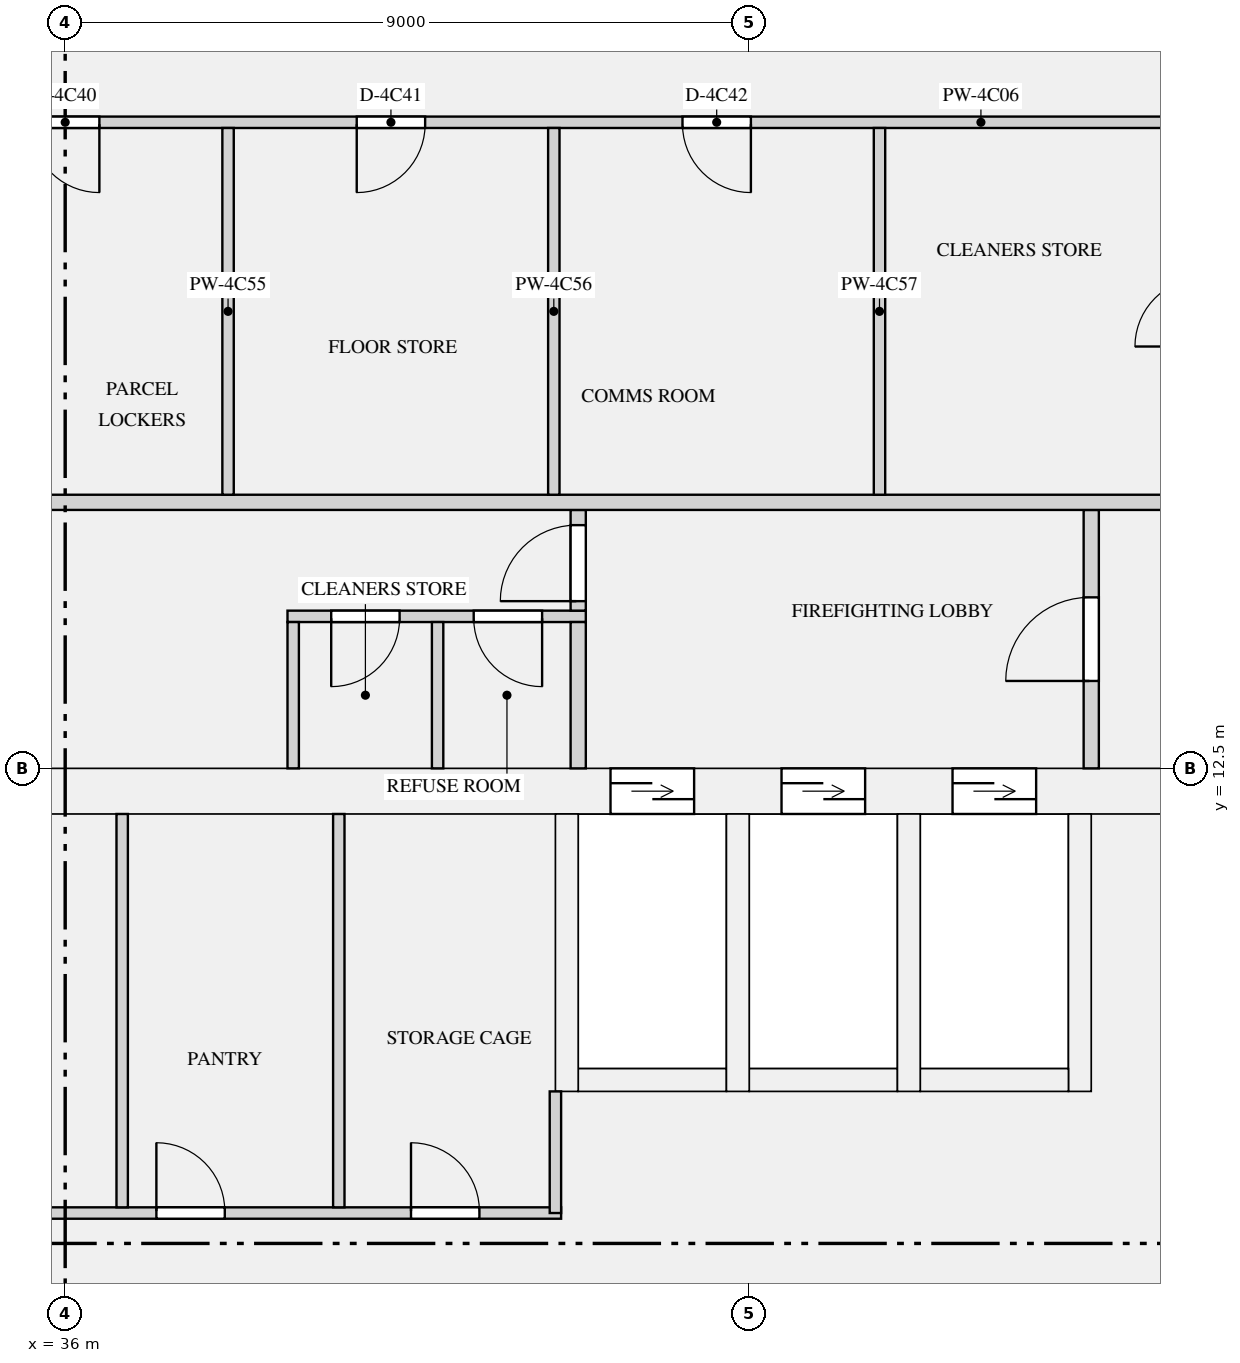
"""IFC4 building model, lengths in metres.
Left out: names, types, materials, properties, quantities, classifications, styles, units other than length and angle.
Written with IfcOpenShell. Run it as: python <this file> out.ifc"""

import sys

from ifc_helpers import new_model, si_unit, direction, frame, frame_2d, origin, place, context, subcontext, project, spatial, rectangle, extrude, element, fill, save


model = new_model("IFC4")
c1 = context("Model", 3, precision=1e-05, world=origin(), true_north=direction((0.0, 1.0)))
c2 = subcontext(c1, "Body", "Model", "MODEL_VIEW")
j1 = project(units=[si_unit("LENGTHUNIT", "METRE"), si_unit("PLANEANGLEUNIT", "RADIAN")], contexts=[c1])
p1 = place(None, origin())
s1 = spatial("IfcSite", under=j1, at=p1, CompositionType="ELEMENT")
p2 = place(p1, origin())
s2 = spatial("IfcBuilding", under=s1, at=p2, CompositionType="ELEMENT")
p3 = place(p2, frame((0.0, 0.0, 216.9)))
s3 = spatial("IfcBuildingStorey", under=s2, at=p3, CompositionType="ELEMENT", Elevation=216.9)
p4 = place(p3, frame((18.6, 12.2, 0.0), z_axis=(0.0, 0.0, 1.0), x_axis=(1.0, 0.0, 0.0)))
e1 = element("IfcWall", 1, at=p4, inside=s3, PredefinedType="SHEAR", context=c2, shape_type="SweptSolid", body=[
    extrude(rectangle(XDim=34.8, YDim=0.6, at=frame_2d((17.4, 0.0))), origin(), (0.0, 0.0, 1.0), 3.15),
])
p5 = place(p4, frame((24.575, 0.0, 0.0)))
e2 = element("IfcOpeningElement", 2, at=p5, cuts=e1, PredefinedType="OPENING", context=c2, shape_type="SweptSolid", body=[
    extrude(rectangle(XDim=1.1, YDim=2.1, at=frame_2d((0.55, 1.05))), frame((0.0, 0.31, 0.0), z_axis=(0.0, -1.0, 0.0), x_axis=(1.0, 0.0, 0.0)), (0.0, 0.0, 1.0), 0.62),
])
p6 = place(p4, frame((26.825, 0.0, 0.0)))
e3 = element("IfcOpeningElement", 3, at=p6, cuts=e1, PredefinedType="OPENING", context=c2, shape_type="SweptSolid", body=[
    extrude(rectangle(XDim=1.1, YDim=2.1, at=frame_2d((0.55, 1.05))), frame((0.0, 0.31, 0.0), z_axis=(0.0, -1.0, 0.0), x_axis=(1.0, 0.0, 0.0)), (0.0, 0.0, 1.0), 0.62),
])
p7 = place(p4, frame((29.075, 0.0, 0.0)))
e4 = element("IfcOpeningElement", 4, at=p7, cuts=e1, PredefinedType="OPENING", context=c2, shape_type="SweptSolid", body=[
    extrude(rectangle(XDim=1.1, YDim=2.1, at=frame_2d((0.55, 1.05))), frame((0.0, 0.31, 0.0), z_axis=(0.0, -1.0, 0.0), x_axis=(1.0, 0.0, 0.0)), (0.0, 0.0, 1.0), 0.62),
])
p8 = place(p4, frame((8.95, 0.0, 0.0)))
e5 = element("IfcOpeningElement", 5, at=p8, cuts=e1, PredefinedType="OPENING", context=c2, shape_type="SweptSolid", body=[
    extrude(rectangle(XDim=0.9, YDim=2.1, at=frame_2d((0.45, 1.05))), frame((0.0, 0.31, 0.0), z_axis=(0.0, -1.0, 0.0), x_axis=(1.0, 0.0, 0.0)), (0.0, 0.0, 1.0), 0.62),
])
p9 = place(p4, frame((1.55, 0.0, 0.0)))
e6 = element("IfcOpeningElement", 6, at=p9, cuts=e1, PredefinedType="OPENING", context=c2, shape_type="SweptSolid", body=[
    extrude(rectangle(XDim=1.2, YDim=2.1, at=frame_2d((0.6, 1.05))), frame((0.0, 0.31, 0.0), z_axis=(0.0, -1.0, 0.0), x_axis=(1.0, 0.0, 0.0)), (0.0, 0.0, 1.0), 0.62),
])
p10 = place(p4, frame((32.05, 0.0, 0.0)))
e7 = element("IfcOpeningElement", 7, at=p10, cuts=e1, PredefinedType="OPENING", context=c2, shape_type="SweptSolid", body=[
    extrude(rectangle(XDim=1.2, YDim=2.1, at=frame_2d((0.6, 1.05))), frame((0.0, 0.31, 0.0), z_axis=(0.0, -1.0, 0.0), x_axis=(1.0, 0.0, 0.0)), (0.0, 0.0, 1.0), 0.62),
])
p11 = place(p3, frame((42.75, 8.4, 0.0), z_axis=(0.0, 0.0, 1.0), x_axis=(1.0, 0.0, 0.0)))
e8 = element("IfcWall", 8, at=p11, inside=s3, PredefinedType="SHEAR", context=c2, shape_type="SweptSolid", body=[
    extrude(rectangle(XDim=1.95, YDim=0.3, at=frame_2d((0.975, 0.0))), origin(), (0.0, 0.0, 1.0), 3.15),
])
p12 = place(p3, frame((42.6, 8.25, 0.0), z_axis=(0.0, 0.0, 1.0), x_axis=(0.0, 1.0, 0.0)))
e9 = element("IfcWall", 9, at=p12, inside=s3, PredefinedType="SHEAR", context=c2, shape_type="SweptSolid", body=[
    extrude(rectangle(XDim=3.65, YDim=0.3, at=frame_2d((1.825, 0.0))), origin(), (0.0, 0.0, 1.0), 3.15),
])
p13 = place(p3, frame((45.0, 8.4, 0.0), z_axis=(0.0, 0.0, 1.0), x_axis=(1.0, 0.0, 0.0)))
e10 = element("IfcWall", 10, at=p13, inside=s3, PredefinedType="SHEAR", context=c2, shape_type="SweptSolid", body=[
    extrude(rectangle(XDim=1.95, YDim=0.3, at=frame_2d((0.975, 0.0))), origin(), (0.0, 0.0, 1.0), 3.15),
])
p14 = place(p3, frame((44.85, 8.25, 0.0), z_axis=(0.0, 0.0, 1.0), x_axis=(0.0, 1.0, 0.0)))
e11 = element("IfcWall", 11, at=p14, inside=s3, PredefinedType="SHEAR", context=c2, shape_type="SweptSolid", body=[
    extrude(rectangle(XDim=3.65, YDim=0.3, at=frame_2d((1.825, 0.0))), origin(), (0.0, 0.0, 1.0), 3.15),
])
p15 = place(p3, frame((47.25, 8.4, 0.0), z_axis=(0.0, 0.0, 1.0), x_axis=(1.0, 0.0, 0.0)))
e12 = element("IfcWall", 12, at=p15, inside=s3, PredefinedType="SHEAR", context=c2, shape_type="SweptSolid", body=[
    extrude(rectangle(XDim=1.95, YDim=0.3, at=frame_2d((0.975, 0.0))), origin(), (0.0, 0.0, 1.0), 3.15),
])
for number, where, z_axis, x_axis in (
    (13, (47.1, 8.25, 0.0), (0.0, 0.0, 1.0), (0.0, 1.0, 0.0)),
    (14, (49.35, 8.25, 0.0), (0.0, 0.0, 1.0), (0.0, 1.0, 0.0)),
):
    element("IfcWall", number, at=place(p3, frame(where, z_axis=z_axis, x_axis=x_axis)), inside=s3, PredefinedType="SHEAR", context=c2, shape_type="SweptSolid", body=[
        extrude(rectangle(XDim=3.65, YDim=0.3, at=frame_2d((1.825, 0.0))), origin(), (0.0, 0.0, 1.0), 3.15),
    ])
p16 = place(p3, frame((22.725, 6.65, 0.0), z_axis=(0.0, 0.0, 1.0), x_axis=(1.0, 0.0, 0.0)))
e15 = element("IfcWall", 15, at=p16, inside=s3, PredefinedType="PARTITIONING", context=c2, shape_type="SweptSolid", body=[
    extrude(rectangle(XDim=19.8, YDim=0.15, at=frame_2d((9.9, 0.0))), origin(), (0.0, 0.0, 1.0), 2.83),
])
p17 = place(p16, frame((0.825, 0.0, 0.0)))
e16 = element("IfcOpeningElement", 16, at=p17, cuts=e15, PredefinedType="OPENING", context=c2, shape_type="SweptSolid", body=[
    extrude(rectangle(XDim=0.9, YDim=2.1, at=frame_2d((0.45, 1.05))), frame((0.0, 0.085, 0.0), z_axis=(0.0, -1.0, 0.0), x_axis=(1.0, 0.0, 0.0)), (0.0, 0.0, 1.0), 0.17),
])
p18 = place(p16, frame((4.825, 0.0, 0.0)))
e17 = element("IfcOpeningElement", 17, at=p18, cuts=e15, PredefinedType="OPENING", context=c2, shape_type="SweptSolid", body=[
    extrude(rectangle(XDim=0.9, YDim=2.1, at=frame_2d((0.45, 1.05))), frame((0.0, 0.085, 0.0), z_axis=(0.0, -1.0, 0.0), x_axis=(1.0, 0.0, 0.0)), (0.0, 0.0, 1.0), 0.17),
])
p19 = place(p16, frame((9.825, 0.0, 0.0)))
e18 = element("IfcOpeningElement", 18, at=p19, cuts=e15, PredefinedType="OPENING", context=c2, shape_type="SweptSolid", body=[
    extrude(rectangle(XDim=0.9, YDim=2.1, at=frame_2d((0.45, 1.05))), frame((0.0, 0.085, 0.0), z_axis=(0.0, -1.0, 0.0), x_axis=(1.0, 0.0, 0.0)), (0.0, 0.0, 1.0), 0.17),
])
p20 = place(p16, frame((14.475, 0.0, 0.0)))
e19 = element("IfcOpeningElement", 19, at=p20, cuts=e15, PredefinedType="OPENING", context=c2, shape_type="SweptSolid", body=[
    extrude(rectangle(XDim=0.9, YDim=2.1, at=frame_2d((0.45, 1.05))), frame((0.0, 0.085, 0.0), z_axis=(0.0, -1.0, 0.0), x_axis=(1.0, 0.0, 0.0)), (0.0, 0.0, 1.0), 0.17),
])
p21 = place(p16, frame((17.825, 0.0, 0.0)))
e20 = element("IfcOpeningElement", 20, at=p21, cuts=e15, PredefinedType="OPENING", context=c2, shape_type="SweptSolid", body=[
    extrude(rectangle(XDim=0.9, YDim=2.1, at=frame_2d((0.45, 1.05))), frame((0.0, 0.085, 0.0), z_axis=(0.0, -1.0, 0.0), x_axis=(1.0, 0.0, 0.0)), (0.0, 0.0, 1.0), 0.17),
])
p22 = place(p3, frame((38.925, 14.5, 0.0), z_axis=(0.0, 0.0, 1.0), x_axis=(1.0, 0.0, 0.0)))
e21 = element("IfcWall", 21, at=p22, inside=s3, PredefinedType="PARTITIONING", context=c2, shape_type="SweptSolid", body=[
    extrude(rectangle(XDim=3.925, YDim=0.15, at=frame_2d((1.962, 0.0))), origin(), (0.0, 0.0, 1.0), 2.83),
])
p23 = place(p22, frame((0.575, 0.0, 0.0)))
e22 = element("IfcOpeningElement", 22, at=p23, cuts=e21, PredefinedType="OPENING", context=c2, shape_type="SweptSolid", body=[
    extrude(rectangle(XDim=0.9, YDim=2.1, at=frame_2d((0.45, 1.05))), frame((0.0, 0.085, 0.0), z_axis=(0.0, -1.0, 0.0), x_axis=(1.0, 0.0, 0.0)), (0.0, 0.0, 1.0), 0.17),
])
p24 = place(p22, frame((2.45, 0.0, 0.0)))
e23 = element("IfcOpeningElement", 23, at=p24, cuts=e21, PredefinedType="OPENING", context=c2, shape_type="SweptSolid", body=[
    extrude(rectangle(XDim=0.9, YDim=2.1, at=frame_2d((0.45, 1.05))), frame((0.0, 0.085, 0.0), z_axis=(0.0, -1.0, 0.0), x_axis=(1.0, 0.0, 0.0)), (0.0, 0.0, 1.0), 0.17),
])
p25 = place(p3, frame((42.45, 6.65, 0.0), z_axis=(0.0, 0.0, 1.0), x_axis=(0.0, 1.0, 0.0)))
e24 = element("IfcWall", 24, at=p25, inside=s3, PredefinedType="PARTITIONING", context=c2, shape_type="SweptSolid", body=[
    extrude(rectangle(XDim=1.6, YDim=0.15, at=frame_2d((0.8, 0.0))), origin(), (0.0, 0.0, 1.0), 2.83),
])
for number, where, z_axis, x_axis in (
    (25, (36.75, 6.725, 0.0), (0.0, 0.0, 1.0), (0.0, 1.0, 0.0)),
    (26, (39.6, 6.725, 0.0), (0.0, 0.0, 1.0), (0.0, 1.0, 0.0)),
):
    element("IfcWall", number, at=place(p3, frame(where, z_axis=z_axis, x_axis=x_axis)), inside=s3, PredefinedType="PARTITIONING", context=c2, shape_type="SweptSolid", body=[
        extrude(rectangle(XDim=5.175, YDim=0.15, at=frame_2d((2.587, 0.0))), origin(), (0.0, 0.0, 1.0), 2.83),
    ])
for number, where, z_axis, x_axis in (
    (27, (39.0, 12.5, 0.0), (0.0, 0.0, 1.0), (0.0, 1.0, 0.0)),
    (28, (40.9, 12.5, 0.0), (0.0, 0.0, 1.0), (0.0, 1.0, 0.0)),
):
    element("IfcWall", number, at=place(p3, frame(where, z_axis=z_axis, x_axis=x_axis)), inside=s3, PredefinedType="PARTITIONING", context=c2, shape_type="SweptSolid", body=[
        extrude(rectangle(XDim=1.925, YDim=0.15, at=frame_2d((0.962, 0.0))), origin(), (0.0, 0.0, 1.0), 2.83),
    ])
p26 = place(p3, frame((42.75, 12.5, 0.0), z_axis=(0.0, 0.0, 1.0), x_axis=(0.0, 1.0, 0.0)))
e29 = element("IfcWall", 29, at=p26, inside=s3, PredefinedType="PARTITIONING", context=c2, shape_type="SweptSolid", body=[
    extrude(rectangle(XDim=1.925, YDim=0.2, at=frame_2d((0.962, 0.0))), origin(), (0.0, 0.0, 1.0), 2.83),
])
p27 = place(p3, frame((49.5, 12.5, 0.0), z_axis=(0.0, 0.0, 1.0), x_axis=(0.0, 1.0, 0.0)))
e30 = element("IfcWall", 30, at=p27, inside=s3, PredefinedType="PARTITIONING", context=c2, shape_type="SweptSolid", body=[
    extrude(rectangle(XDim=3.4, YDim=0.2, at=frame_2d((1.7, 0.0))), origin(), (0.0, 0.0, 1.0), 2.83),
])
p28 = place(p27, frame((1.15, 0.0, 0.0)))
e31 = element("IfcOpeningElement", 31, at=p28, cuts=e30, PredefinedType="OPENING", context=c2, shape_type="SweptSolid", body=[
    extrude(rectangle(XDim=1.1, YDim=2.1, at=frame_2d((0.55, 1.05))), frame((0.0, 0.11, 0.0), z_axis=(0.0, -1.0, 0.0), x_axis=(1.0, 0.0, 0.0)), (0.0, 0.0, 1.0), 0.22),
])
p29 = place(p3, frame((42.75, 14.575, 0.0), z_axis=(0.0, 0.0, 1.0), x_axis=(0.0, 1.0, 0.0)))
e32 = element("IfcWall", 32, at=p29, inside=s3, PredefinedType="PARTITIONING", context=c2, shape_type="SweptSolid", body=[
    extrude(rectangle(XDim=1.325, YDim=0.2, at=frame_2d((0.663, 0.0))), origin(), (0.0, 0.0, 1.0), 2.83),
])
p30 = place(p29, frame((0.125, 0.0, 0.0)))
e33 = element("IfcOpeningElement", 33, at=p30, cuts=e32, PredefinedType="OPENING", context=c2, shape_type="SweptSolid", body=[
    extrude(rectangle(XDim=1.0, YDim=2.1, at=frame_2d((0.5, 1.05))), frame((0.0, 0.11, 0.0), z_axis=(0.0, -1.0, 0.0), x_axis=(1.0, 0.0, 0.0)), (0.0, 0.0, 1.0), 0.22),
])
p31 = place(p3, frame((20.925, 21.0, 0.0), z_axis=(0.0, 0.0, 1.0), x_axis=(1.0, 0.0, 0.0)))
e34 = element("IfcWall", 34, at=p31, inside=s3, PredefinedType="PARTITIONING", context=c2, shape_type="SweptSolid", body=[
    extrude(rectangle(XDim=30.15, YDim=0.15, at=frame_2d((15.075, 0.0))), origin(), (0.0, 0.0, 1.0), 2.83),
])
p32 = place(p31, frame((6.053, 0.0, 0.0)))
e35 = element("IfcOpeningElement", 35, at=p32, cuts=e34, PredefinedType="OPENING", context=c2, shape_type="SweptSolid", body=[
    extrude(rectangle(XDim=0.9, YDim=2.1, at=frame_2d((0.45, 1.05))), frame((0.0, 0.085, 0.0), z_axis=(0.0, -1.0, 0.0), x_axis=(1.0, 0.0, 0.0)), (0.0, 0.0, 1.0), 0.17),
])
p33 = place(p31, frame((10.339, 0.0, 0.0)))
e36 = element("IfcOpeningElement", 36, at=p33, cuts=e34, PredefinedType="OPENING", context=c2, shape_type="SweptSolid", body=[
    extrude(rectangle(XDim=0.9, YDim=2.1, at=frame_2d((0.45, 1.05))), frame((0.0, 0.085, 0.0), z_axis=(0.0, -1.0, 0.0), x_axis=(1.0, 0.0, 0.0)), (0.0, 0.0, 1.0), 0.17),
])
p34 = place(p31, frame((14.625, 0.0, 0.0)))
e37 = element("IfcOpeningElement", 37, at=p34, cuts=e34, PredefinedType="OPENING", context=c2, shape_type="SweptSolid", body=[
    extrude(rectangle(XDim=0.9, YDim=2.1, at=frame_2d((0.45, 1.05))), frame((0.0, 0.085, 0.0), z_axis=(0.0, -1.0, 0.0), x_axis=(1.0, 0.0, 0.0)), (0.0, 0.0, 1.0), 0.17),
])
p35 = place(p31, frame((18.911, 0.0, 0.0)))
e38 = element("IfcOpeningElement", 38, at=p35, cuts=e34, PredefinedType="OPENING", context=c2, shape_type="SweptSolid", body=[
    extrude(rectangle(XDim=0.9, YDim=2.1, at=frame_2d((0.45, 1.05))), frame((0.0, 0.085, 0.0), z_axis=(0.0, -1.0, 0.0), x_axis=(1.0, 0.0, 0.0)), (0.0, 0.0, 1.0), 0.17),
])
p36 = place(p31, frame((23.197, 0.0, 0.0)))
e39 = element("IfcOpeningElement", 39, at=p36, cuts=e34, PredefinedType="OPENING", context=c2, shape_type="SweptSolid", body=[
    extrude(rectangle(XDim=0.9, YDim=2.1, at=frame_2d((0.45, 1.05))), frame((0.0, 0.085, 0.0), z_axis=(0.0, -1.0, 0.0), x_axis=(1.0, 0.0, 0.0)), (0.0, 0.0, 1.0), 0.17),
])
p37 = place(p3, frame((17.925, 16.0, 0.0), z_axis=(0.0, 0.0, 1.0), x_axis=(1.0, 0.0, 0.0)))
e40 = element("IfcWall", 40, at=p37, inside=s3, PredefinedType="PARTITIONING", context=c2, shape_type="SweptSolid", body=[
    extrude(rectangle(XDim=36.175, YDim=0.2, at=frame_2d((18.087, 0.0))), origin(), (0.0, 0.0, 1.0), 2.83),
])
p38 = place(p37, frame((0.875, 0.0, 0.0)))
e41 = element("IfcOpeningElement", 41, at=p38, cuts=e40, PredefinedType="OPENING", context=c2, shape_type="SweptSolid", body=[
    extrude(rectangle(XDim=1.4, YDim=2.1, at=frame_2d((0.7, 1.05))), frame((0.0, 0.11, 0.0), z_axis=(0.0, -1.0, 0.0), x_axis=(1.0, 0.0, 0.0)), (0.0, 0.0, 1.0), 0.22),
])
p39 = place(p37, frame((33.875, 0.0, 0.0)))
e42 = element("IfcOpeningElement", 42, at=p39, cuts=e40, PredefinedType="OPENING", context=c2, shape_type="SweptSolid", body=[
    extrude(rectangle(XDim=1.4, YDim=2.1, at=frame_2d((0.7, 1.05))), frame((0.0, 0.11, 0.0), z_axis=(0.0, -1.0, 0.0), x_axis=(1.0, 0.0, 0.0)), (0.0, 0.0, 1.0), 0.22),
])
for number, where, z_axis, x_axis in (
    (43, (38.143, 16.1, 0.0), (0.0, 0.0, 1.0), (0.0, 1.0, 0.0)),
    (44, (42.429, 16.1, 0.0), (0.0, 0.0, 1.0), (0.0, 1.0, 0.0)),
    (45, (46.714, 16.1, 0.0), (0.0, 0.0, 1.0), (0.0, 1.0, 0.0)),
):
    element("IfcWall", number, at=place(p3, frame(where, z_axis=z_axis, x_axis=x_axis)), inside=s3, PredefinedType="PARTITIONING", context=c2, shape_type="SweptSolid", body=[
        extrude(rectangle(XDim=4.825, YDim=0.15, at=frame_2d((2.413, 0.0))), origin(), (0.0, 0.0, 1.0), 2.83),
    ])
p40 = place(p5, origin())
e46 = element("IfcDoor", 46, at=p40, inside=s3, OperationType="DOUBLE_DOOR_SLIDING", PredefinedType="DOOR", context=c2, shape_type="SweptSolid", body=[
    extrude(rectangle(XDim=1.1, YDim=2.1, at=frame_2d((0.55, 1.05))), frame((0.0, 0.025, 0.0), z_axis=(0.0, -1.0, 0.0), x_axis=(1.0, 0.0, 0.0)), (0.0, 0.0, 1.0), 0.05),
])
fill(e2, e46)
p41 = place(p6, origin())
e47 = element("IfcDoor", 47, at=p41, inside=s3, OperationType="DOUBLE_DOOR_SLIDING", PredefinedType="DOOR", context=c2, shape_type="SweptSolid", body=[
    extrude(rectangle(XDim=1.1, YDim=2.1, at=frame_2d((0.55, 1.05))), frame((0.0, 0.025, 0.0), z_axis=(0.0, -1.0, 0.0), x_axis=(1.0, 0.0, 0.0)), (0.0, 0.0, 1.0), 0.05),
])
fill(e3, e47)
p42 = place(p7, origin())
e48 = element("IfcDoor", 48, at=p42, inside=s3, OperationType="DOUBLE_DOOR_SLIDING", PredefinedType="DOOR", context=c2, shape_type="SweptSolid", body=[
    extrude(rectangle(XDim=1.1, YDim=2.1, at=frame_2d((0.55, 1.05))), frame((0.0, 0.025, 0.0), z_axis=(0.0, -1.0, 0.0), x_axis=(1.0, 0.0, 0.0)), (0.0, 0.0, 1.0), 0.05),
])
fill(e4, e48)
p43 = place(p23, frame((0.9, 0.0, 0.0), z_axis=(0.0, 0.0, 1.0), x_axis=(-1.0, 0.0, 0.0)))
e49 = element("IfcDoor", 49, at=p43, inside=s3, OperationType="SINGLE_SWING_RIGHT", PredefinedType="DOOR", context=c2, shape_type="SweptSolid", body=[
    extrude(rectangle(XDim=0.9, YDim=2.1, at=frame_2d((0.45, 1.05))), frame((0.0, 0.025, 0.0), z_axis=(0.0, -1.0, 0.0), x_axis=(1.0, 0.0, 0.0)), (0.0, 0.0, 1.0), 0.05),
])
fill(e22, e49)
p44 = place(p24, frame((0.9, 0.0, 0.0), z_axis=(0.0, 0.0, 1.0), x_axis=(-1.0, 0.0, 0.0)))
e50 = element("IfcDoor", 50, at=p44, inside=s3, OperationType="SINGLE_SWING_LEFT", PredefinedType="DOOR", context=c2, shape_type="SweptSolid", body=[
    extrude(rectangle(XDim=0.9, YDim=2.1, at=frame_2d((0.45, 1.05))), frame((0.0, 0.025, 0.0), z_axis=(0.0, -1.0, 0.0), x_axis=(1.0, 0.0, 0.0)), (0.0, 0.0, 1.0), 0.05),
])
fill(e23, e50)
p45 = place(p20, origin())
e51 = element("IfcDoor", 51, at=p45, inside=s3, OperationType="SINGLE_SWING_LEFT", PredefinedType="DOOR", context=c2, shape_type="SweptSolid", body=[
    extrude(rectangle(XDim=0.9, YDim=2.1, at=frame_2d((0.45, 1.05))), frame((0.0, 0.025, 0.0), z_axis=(0.0, -1.0, 0.0), x_axis=(1.0, 0.0, 0.0)), (0.0, 0.0, 1.0), 0.05),
])
fill(e19, e51)
p46 = place(p21, origin())
e52 = element("IfcDoor", 52, at=p46, inside=s3, OperationType="SINGLE_SWING_LEFT", PredefinedType="DOOR", context=c2, shape_type="SweptSolid", body=[
    extrude(rectangle(XDim=0.9, YDim=2.1, at=frame_2d((0.45, 1.05))), frame((0.0, 0.025, 0.0), z_axis=(0.0, -1.0, 0.0), x_axis=(1.0, 0.0, 0.0)), (0.0, 0.0, 1.0), 0.05),
])
fill(e20, e52)
p47 = place(p30, origin())
e53 = element("IfcDoor", 53, at=p47, inside=s3, OperationType="SINGLE_SWING_LEFT", PredefinedType="DOOR", context=c2, shape_type="SweptSolid", body=[
    extrude(rectangle(XDim=1.0, YDim=2.1, at=frame_2d((0.5, 1.05))), frame((0.0, 0.025, 0.0), z_axis=(0.0, -1.0, 0.0), x_axis=(1.0, 0.0, 0.0)), (0.0, 0.0, 1.0), 0.05),
])
fill(e33, e53)
p48 = place(p28, origin())
e54 = element("IfcDoor", 54, at=p48, inside=s3, OperationType="SINGLE_SWING_LEFT", PredefinedType="DOOR", context=c2, shape_type="SweptSolid", body=[
    extrude(rectangle(XDim=1.1, YDim=2.1, at=frame_2d((0.55, 1.05))), frame((0.0, 0.025, 0.0), z_axis=(0.0, -1.0, 0.0), x_axis=(1.0, 0.0, 0.0)), (0.0, 0.0, 1.0), 0.05),
])
fill(e31, e54)
p49 = place(p34, frame((0.9, 0.0, 0.0), z_axis=(0.0, 0.0, 1.0), x_axis=(-1.0, 0.0, 0.0)))
e55 = element("IfcDoor", 55, at=p49, inside=s3, OperationType="SINGLE_SWING_LEFT", PredefinedType="DOOR", context=c2, shape_type="SweptSolid", body=[
    extrude(rectangle(XDim=0.9, YDim=2.1, at=frame_2d((0.45, 1.05))), frame((0.0, 0.025, 0.0), z_axis=(0.0, -1.0, 0.0), x_axis=(1.0, 0.0, 0.0)), (0.0, 0.0, 1.0), 0.05),
])
fill(e37, e55)
p50 = place(p35, frame((0.9, 0.0, 0.0), z_axis=(0.0, 0.0, 1.0), x_axis=(-1.0, 0.0, 0.0)))
e56 = element("IfcDoor", 56, at=p50, inside=s3, OperationType="SINGLE_SWING_RIGHT", PredefinedType="DOOR", context=c2, shape_type="SweptSolid", body=[
    extrude(rectangle(XDim=0.9, YDim=2.1, at=frame_2d((0.45, 1.05))), frame((0.0, 0.025, 0.0), z_axis=(0.0, -1.0, 0.0), x_axis=(1.0, 0.0, 0.0)), (0.0, 0.0, 1.0), 0.05),
])
fill(e38, e56)
p51 = place(p36, frame((0.9, 0.0, 0.0), z_axis=(0.0, 0.0, 1.0), x_axis=(-1.0, 0.0, 0.0)))
e57 = element("IfcDoor", 57, at=p51, inside=s3, OperationType="SINGLE_SWING_LEFT", PredefinedType="DOOR", context=c2, shape_type="SweptSolid", body=[
    extrude(rectangle(XDim=0.9, YDim=2.1, at=frame_2d((0.45, 1.05))), frame((0.0, 0.025, 0.0), z_axis=(0.0, -1.0, 0.0), x_axis=(1.0, 0.0, 0.0)), (0.0, 0.0, 1.0), 0.05),
])
fill(e39, e57)
save(model, sys.argv[1])
